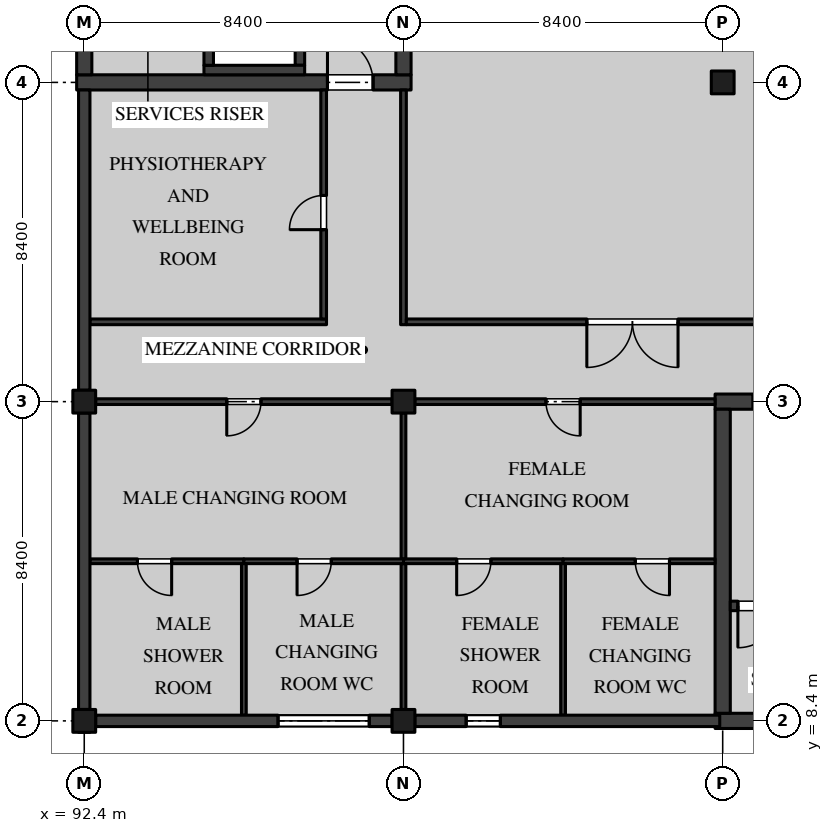
"""IFC4 building model, lengths in metres.
Left out: names, types, materials, properties, quantities, classifications, styles, units other than length and angle.
Written with IfcOpenShell. Run it as: python <this file> out.ifc"""

import sys

from ifc_helpers import new_model, si_unit, direction, frame, frame_2d, origin, origin_2d, place, context, subcontext, project, spatial, polyline, rectangle, outline, extrude, element, fill, save


model = new_model("IFC4")
c1 = context("Model", 3, precision=1e-05, world=origin(), true_north=direction((0.0, 1.0)))
c2 = subcontext(c1, "Body", "Model", "MODEL_VIEW")
j1 = project(units=[si_unit("LENGTHUNIT", "METRE"), si_unit("PLANEANGLEUNIT", "RADIAN")], contexts=[c1])
p1 = place(None, origin())
s1 = spatial("IfcSite", under=j1, at=p1, CompositionType="ELEMENT")
p2 = place(p1, origin())
s2 = spatial("IfcBuilding", under=s1, at=p2, CompositionType="ELEMENT")
p3 = place(p2, frame((0.0, 0.0, 5.4)))
s3 = spatial("IfcBuildingStorey", under=s2, at=p3, CompositionType="ELEMENT", Elevation=5.4)
for number, where, z_axis, x_axis in (
    (1, (92.4, 8.4, 0.0), (0.0, 0.0, 1.0), (1.0, 0.0, 0.0)),
    (2, (92.4, 16.8, 0.0), (0.0, 0.0, 1.0), (1.0, 0.0, 0.0)),
    (3, (100.8, 8.4, 0.0), (0.0, 0.0, 1.0), (1.0, 0.0, 0.0)),
    (4, (100.8, 16.8, 0.0), (0.0, 0.0, 1.0), (1.0, 0.0, 0.0)),
    (5, (109.2, 25.2, 0.0), (0.0, 0.0, 1.0), (1.0, 0.0, 0.0)),
):
    element("IfcColumn", number, at=place(p3, frame(where, z_axis=z_axis, x_axis=x_axis)), inside=s3, PredefinedType="COLUMN", context=c2, shape_type="SweptSolid", body=[
        extrude(rectangle(XDim=0.6, YDim=0.6, at=origin_2d()), origin(), (0.0, 0.0, 1.0), 3.0),
    ])
p4 = place(p3, frame((92.2, 25.2, 0.0), z_axis=(0.0, 0.0, 1.0), x_axis=(1.0, 0.0, 0.0)))
e6 = element("IfcWall", 6, at=p4, inside=s3, PredefinedType="SHEAR", context=c2, shape_type="SweptSolid", body=[
    extrude(rectangle(XDim=8.8, YDim=0.4, at=frame_2d((4.4, 0.0))), origin(), (0.0, 0.0, 1.0), 3.0),
])
p5 = place(p4, frame((6.6, 0.0, 0.0)))
e7 = element("IfcOpeningElement", 7, at=p5, cuts=e6, PredefinedType="OPENING", context=c2, shape_type="SweptSolid", body=[
    extrude(rectangle(XDim=1.2, YDim=2.1, at=frame_2d((0.6, 1.05))), frame((0.0, 0.21, 0.0), z_axis=(0.0, -1.0, 0.0), x_axis=(1.0, 0.0, 0.0)), (0.0, 0.0, 1.0), 0.42),
])
for number, where, z_axis, x_axis in (
    (8, (92.4, 25.4, 0.0), (0.0, 0.0, 1.0), (0.0, 1.0, 0.0)),
    (9, (100.8, 25.4, 0.0), (0.0, 0.0, 1.0), (0.0, 1.0, 0.0)),
):
    element("IfcWall", number, at=place(p3, frame(where, z_axis=z_axis, x_axis=x_axis)), inside=s3, PredefinedType="SHEAR", context=c2, shape_type="SweptSolid", body=[
        extrude(rectangle(XDim=8.0, YDim=0.4, at=frame_2d((4.0, 0.0))), origin(), (0.0, 0.0, 1.0), 3.0),
    ])
p6 = place(p3, frame((109.0, 8.4, 0.0), z_axis=(0.0, 0.0, 1.0), x_axis=(1.0, 0.0, 0.0)))
e10 = element("IfcWall", 10, at=p6, inside=s3, PredefinedType="SHEAR", context=c2, shape_type="SweptSolid", body=[
    extrude(rectangle(XDim=8.8, YDim=0.4, at=frame_2d((4.4, 0.0))), origin(), (0.0, 0.0, 1.0), 3.0),
])
p7 = place(p3, frame((109.0, 16.8, 0.0), z_axis=(0.0, 0.0, 1.0), x_axis=(1.0, 0.0, 0.0)))
e11 = element("IfcWall", 11, at=p7, inside=s3, PredefinedType="SHEAR", context=c2, shape_type="SweptSolid", body=[
    extrude(rectangle(XDim=8.8, YDim=0.4, at=frame_2d((4.4, 0.0))), origin(), (0.0, 0.0, 1.0), 3.0),
])
p8 = place(p7, frame((1.0, 0.0, 0.0)))
e12 = element("IfcOpeningElement", 12, at=p8, cuts=e11, PredefinedType="OPENING", context=c2, shape_type="SweptSolid", body=[
    extrude(rectangle(XDim=1.2, YDim=2.1, at=frame_2d((0.6, 1.05))), frame((0.0, 0.21, 0.0), z_axis=(0.0, -1.0, 0.0), x_axis=(1.0, 0.0, 0.0)), (0.0, 0.0, 1.0), 0.42),
])
p9 = place(p3, frame((109.2, 8.6, 0.0), z_axis=(0.0, 0.0, 1.0), x_axis=(0.0, 1.0, 0.0)))
e13 = element("IfcWall", 13, at=p9, inside=s3, PredefinedType="SHEAR", context=c2, shape_type="SweptSolid", body=[
    extrude(rectangle(XDim=8.0, YDim=0.4, at=frame_2d((4.0, 0.0))), origin(), (0.0, 0.0, 1.0), 3.0),
])
p10 = place(p3, frame((109.4, 11.425, 0.0), z_axis=(0.0, 0.0, 1.0), x_axis=(1.0, 0.0, 0.0)))
e14 = element("IfcWall", 14, at=p10, inside=s3, PredefinedType="SOLIDWALL", context=c2, shape_type="SweptSolid", body=[
    extrude(rectangle(XDim=8.0, YDim=0.25, at=frame_2d((4.0, 0.0))), origin(), (0.0, 0.0, 1.0), 3.0),
])
p11 = place(p10, frame((0.2, 0.0, 0.0)))
e15 = element("IfcOpeningElement", 15, at=p11, cuts=e14, PredefinedType="OPENING", context=c2, shape_type="SweptSolid", body=[
    extrude(rectangle(XDim=1.1, YDim=2.1, at=frame_2d((0.55, 1.05))), frame((0.0, 0.135, 0.0), z_axis=(0.0, -1.0, 0.0), x_axis=(1.0, 0.0, 0.0)), (0.0, 0.0, 1.0), 0.27),
])
p12 = place(p3, frame((98.075, 25.65, 0.0), z_axis=(0.0, 0.0, 1.0), x_axis=(0.0, 1.0, 0.0)))
e16 = element("IfcWall", 16, at=p12, inside=s3, PredefinedType="SOLIDWALL", context=c2, shape_type="SweptSolid", body=[
    extrude(rectangle(XDim=2.3, YDim=0.25, at=frame_2d((1.15, 0.0))), origin(), (0.0, 0.0, 1.0), 3.0),
])
p13 = place(p3, frame((95.55, 25.525, 0.0), z_axis=(0.0, 0.0, 1.0), x_axis=(1.0, 0.0, 0.0)))
e17 = element("IfcWall", 17, at=p13, inside=s3, PredefinedType="SOLIDWALL", context=c2, shape_type="SweptSolid", body=[
    extrude(rectangle(XDim=2.65, YDim=0.25, at=frame_2d((1.325, 0.0))), origin(), (0.0, 0.0, 1.0), 3.0),
])
p14 = place(p3, frame((95.675, 25.65, 0.0), z_axis=(0.0, 0.0, 1.0), x_axis=(0.0, 1.0, 0.0)))
e18 = element("IfcWall", 18, at=p14, inside=s3, PredefinedType="SOLIDWALL", context=c2, shape_type="SweptSolid", body=[
    extrude(rectangle(XDim=2.3, YDim=0.25, at=frame_2d((1.15, 0.0))), origin(), (0.0, 0.0, 1.0), 3.0),
])
p15 = place(p3, frame((100.8, 18.825, 0.0), z_axis=(0.0, 0.0, 1.0), x_axis=(0.0, 1.0, 0.0)))
e19 = element("IfcWall", 19, at=p15, inside=s3, PredefinedType="PARTITIONING", context=c2, shape_type="SweptSolid", body=[
    extrude(rectangle(XDim=6.175, YDim=0.15, at=frame_2d((3.087, 0.0))), origin(), (0.0, 0.0, 1.0), 2.975),
])
p16 = place(p3, frame((100.875, 18.9, 0.0), z_axis=(0.0, 0.0, 1.0), x_axis=(1.0, 0.0, 0.0)))
e20 = element("IfcWall", 20, at=p16, inside=s3, PredefinedType="PARTITIONING", context=c2, shape_type="SweptSolid", body=[
    extrude(rectangle(XDim=12.425, YDim=0.15, at=frame_2d((6.212, 0.0))), origin(), (0.0, 0.0, 1.0), 4.37),
])
p17 = place(p16, frame((4.75, 0.0, 0.0)))
e21 = element("IfcOpeningElement", 21, at=p17, cuts=e20, PredefinedType="OPENING", context=c2, shape_type="SweptSolid", body=[
    extrude(rectangle(XDim=2.4, YDim=2.7, at=frame_2d((1.2, 1.35))), frame((0.0, 0.085, 0.0), z_axis=(0.0, -1.0, 0.0), x_axis=(1.0, 0.0, 0.0)), (0.0, 0.0, 1.0), 0.17),
])
p18 = place(p3, frame((101.1, 16.8, 0.0), z_axis=(0.0, 0.0, 1.0), x_axis=(1.0, 0.0, 0.0)))
e22 = element("IfcWall", 22, at=p18, inside=s3, PredefinedType="PARTITIONING", context=c2, shape_type="SweptSolid", body=[
    extrude(rectangle(XDim=7.9, YDim=0.15, at=frame_2d((3.95, 0.0))), origin(), (0.0, 0.0, 1.0), 4.37),
])
p19 = place(p18, frame((3.45, 0.0, 0.0)))
e23 = element("IfcOpeningElement", 23, at=p19, cuts=e22, PredefinedType="OPENING", context=c2, shape_type="SweptSolid", body=[
    extrude(rectangle(XDim=0.9, YDim=2.1, at=frame_2d((0.45, 1.05))), frame((0.0, 0.085, 0.0), z_axis=(0.0, -1.0, 0.0), x_axis=(1.0, 0.0, 0.0)), (0.0, 0.0, 1.0), 0.17),
])
p20 = place(p3, frame((92.7, 16.8, 0.0), z_axis=(0.0, 0.0, 1.0), x_axis=(1.0, 0.0, 0.0)))
e24 = element("IfcWall", 24, at=p20, inside=s3, PredefinedType="PARTITIONING", context=c2, shape_type="SweptSolid", body=[
    extrude(rectangle(XDim=7.8, YDim=0.15, at=frame_2d((3.9, 0.0))), origin(), (0.0, 0.0, 1.0), 4.37),
])
p21 = place(p20, frame((3.45, 0.0, 0.0)))
e25 = element("IfcOpeningElement", 25, at=p21, cuts=e24, PredefinedType="OPENING", context=c2, shape_type="SweptSolid", body=[
    extrude(rectangle(XDim=0.9, YDim=2.1, at=frame_2d((0.45, 1.05))), frame((0.0, 0.085, 0.0), z_axis=(0.0, -1.0, 0.0), x_axis=(1.0, 0.0, 0.0)), (0.0, 0.0, 1.0), 0.17),
])
p22 = place(p3, frame((92.55, 18.9, 0.0), z_axis=(0.0, 0.0, 1.0), x_axis=(1.0, 0.0, 0.0)))
e26 = element("IfcWall", 26, at=p22, inside=s3, PredefinedType="PARTITIONING", context=c2, shape_type="SweptSolid", body=[
    extrude(rectangle(XDim=6.225, YDim=0.15, at=frame_2d((3.112, 0.0))), origin(), (0.0, 0.0, 1.0), 4.37),
])
p23 = place(p3, frame((98.7, 18.975, 0.0), z_axis=(0.0, 0.0, 1.0), x_axis=(0.0, 1.0, 0.0)))
e27 = element("IfcWall", 27, at=p23, inside=s3, PredefinedType="PARTITIONING", context=c2, shape_type="SweptSolid", body=[
    extrude(rectangle(XDim=6.025, YDim=0.15, at=frame_2d((3.012, 0.0))), origin(), (0.0, 0.0, 1.0), 4.37),
])
p24 = place(p23, frame((2.35, 0.0, 0.0)))
e28 = element("IfcOpeningElement", 28, at=p24, cuts=e27, PredefinedType="OPENING", context=c2, shape_type="SweptSolid", body=[
    extrude(rectangle(XDim=0.9, YDim=2.1, at=frame_2d((0.45, 1.05))), frame((0.0, 0.085, 0.0), z_axis=(0.0, -1.0, 0.0), x_axis=(1.0, 0.0, 0.0)), (0.0, 0.0, 1.0), 0.17),
])
p25 = place(p3, frame((100.8, 12.6, 0.0), z_axis=(0.0, 0.0, 1.0), x_axis=(1.0, 0.0, 0.0)))
e29 = element("IfcWall", 29, at=p25, inside=s3, PredefinedType="PARTITIONING", context=c2, shape_type="SweptSolid", body=[
    extrude(rectangle(XDim=4.2, YDim=0.125, at=frame_2d((2.1, 0.0))), origin(), (0.0, 0.0, 1.0), 4.37),
])
p26 = place(p25, frame((1.4, 0.0, 0.0)))
e30 = element("IfcOpeningElement", 30, at=p26, cuts=e29, PredefinedType="OPENING", context=c2, shape_type="SweptSolid", body=[
    extrude(rectangle(XDim=0.9, YDim=2.1, at=frame_2d((0.45, 1.05))), frame((0.0, 0.073, 0.0), z_axis=(0.0, -1.0, 0.0), x_axis=(1.0, 0.0, 0.0)), (0.0, 0.0, 1.0), 0.145),
])
p27 = place(p3, frame((105.0, 12.6, 0.0), z_axis=(0.0, 0.0, 1.0), x_axis=(1.0, 0.0, 0.0)))
e31 = element("IfcWall", 31, at=p27, inside=s3, PredefinedType="PARTITIONING", context=c2, shape_type="SweptSolid", body=[
    extrude(rectangle(XDim=4.0, YDim=0.125, at=frame_2d((2.0, 0.0))), origin(), (0.0, 0.0, 1.0), 4.37),
])
p28 = place(p27, frame((1.9, 0.0, 0.0)))
e32 = element("IfcOpeningElement", 32, at=p28, cuts=e31, PredefinedType="OPENING", context=c2, shape_type="SweptSolid", body=[
    extrude(rectangle(XDim=0.9, YDim=2.1, at=frame_2d((0.45, 1.05))), frame((0.0, 0.073, 0.0), z_axis=(0.0, -1.0, 0.0), x_axis=(1.0, 0.0, 0.0)), (0.0, 0.0, 1.0), 0.145),
])
p29 = place(p3, frame((100.8, 12.662, 0.0), z_axis=(0.0, 0.0, 1.0), x_axis=(0.0, 1.0, 0.0)))
e33 = element("IfcWall", 33, at=p29, inside=s3, PredefinedType="PARTITIONING", context=c2, shape_type="SweptSolid", body=[
    extrude(rectangle(XDim=3.838, YDim=0.125, at=frame_2d((1.919, 0.0))), origin(), (0.0, 0.0, 1.0), 2.975),
])
p30 = place(p3, frame((105.0, 8.55, 0.0), z_axis=(0.0, 0.0, 1.0), x_axis=(0.0, 1.0, 0.0)))
e34 = element("IfcWall", 34, at=p30, inside=s3, PredefinedType="PARTITIONING", context=c2, shape_type="SweptSolid", body=[
    extrude(rectangle(XDim=3.987, YDim=0.125, at=frame_2d((1.994, 0.0))), origin(), (0.0, 0.0, 1.0), 4.37),
])
p31 = place(p3, frame((100.8, 8.7, 0.0), z_axis=(0.0, 0.0, 1.0), x_axis=(0.0, 1.0, 0.0)))
e35 = element("IfcWall", 35, at=p31, inside=s3, PredefinedType="PARTITIONING", context=c2, shape_type="SweptSolid", body=[
    extrude(rectangle(XDim=3.837, YDim=0.125, at=frame_2d((1.918, 0.0))), origin(), (0.0, 0.0, 1.0), 2.975),
])
p32 = place(p3, frame((92.55, 12.6, 0.0), z_axis=(0.0, 0.0, 1.0), x_axis=(1.0, 0.0, 0.0)))
e36 = element("IfcWall", 36, at=p32, inside=s3, PredefinedType="PARTITIONING", context=c2, shape_type="SweptSolid", body=[
    extrude(rectangle(XDim=4.05, YDim=0.125, at=frame_2d((2.025, 0.0))), origin(), (0.0, 0.0, 1.0), 4.37),
])
p33 = place(p32, frame((1.25, 0.0, 0.0)))
e37 = element("IfcOpeningElement", 37, at=p33, cuts=e36, PredefinedType="OPENING", context=c2, shape_type="SweptSolid", body=[
    extrude(rectangle(XDim=0.9, YDim=2.1, at=frame_2d((0.45, 1.05))), frame((0.0, 0.073, 0.0), z_axis=(0.0, -1.0, 0.0), x_axis=(1.0, 0.0, 0.0)), (0.0, 0.0, 1.0), 0.145),
])
p34 = place(p3, frame((96.6, 12.6, 0.0), z_axis=(0.0, 0.0, 1.0), x_axis=(1.0, 0.0, 0.0)))
e38 = element("IfcWall", 38, at=p34, inside=s3, PredefinedType="PARTITIONING", context=c2, shape_type="SweptSolid", body=[
    extrude(rectangle(XDim=4.2, YDim=0.125, at=frame_2d((2.1, 0.0))), origin(), (0.0, 0.0, 1.0), 4.37),
])
p35 = place(p34, frame((1.4, 0.0, 0.0)))
e39 = element("IfcOpeningElement", 39, at=p35, cuts=e38, PredefinedType="OPENING", context=c2, shape_type="SweptSolid", body=[
    extrude(rectangle(XDim=0.9, YDim=2.1, at=frame_2d((0.45, 1.05))), frame((0.0, 0.073, 0.0), z_axis=(0.0, -1.0, 0.0), x_axis=(1.0, 0.0, 0.0)), (0.0, 0.0, 1.0), 0.145),
])
p36 = place(p3, frame((96.6, 8.55, 0.0), z_axis=(0.0, 0.0, 1.0), x_axis=(0.0, 1.0, 0.0)))
e40 = element("IfcWall", 40, at=p36, inside=s3, PredefinedType="PARTITIONING", context=c2, shape_type="SweptSolid", body=[
    extrude(rectangle(XDim=3.987, YDim=0.125, at=frame_2d((1.994, 0.0))), origin(), (0.0, 0.0, 1.0), 4.37),
])
p37 = place(p3, frame((92.4, 17.1, 3.0), z_axis=(0.0, 0.0, 1.0), x_axis=(0.0, -1.0, 0.0)))
e41 = element("IfcWall", 41, at=p37, inside=s3, PredefinedType="SOLIDWALL", context=c2, shape_type="SweptSolid", body=[
    extrude(rectangle(XDim=0.6, YDim=0.3, at=frame_2d((0.3, 0.0))), origin(), (0.0, 0.0, 1.0), 1.5),
])
p38 = place(p3, frame((92.4, 25.0, 0.0), z_axis=(0.0, 0.0, 1.0), x_axis=(0.0, -1.0, 0.0)))
e42 = element("IfcWall", 42, at=p38, inside=s3, PredefinedType="SOLIDWALL", context=c2, shape_type="SweptSolid", body=[
    extrude(rectangle(XDim=7.9, YDim=0.3, at=frame_2d((3.95, 0.0))), origin(), (0.0, 0.0, 1.0), 2.975),
])
p39 = place(p3, frame((92.4, 8.7, 3.0), z_axis=(0.0, 0.0, 1.0), x_axis=(0.0, -1.0, 0.0)))
e43 = element("IfcWall", 43, at=p39, inside=s3, PredefinedType="SOLIDWALL", context=c2, shape_type="SweptSolid", body=[
    extrude(rectangle(XDim=0.6, YDim=0.3, at=frame_2d((0.3, 0.0))), origin(), (0.0, 0.0, 1.0), 1.5),
])
p40 = place(p3, frame((92.4, 16.5, 0.0), z_axis=(0.0, 0.0, 1.0), x_axis=(0.0, -1.0, 0.0)))
e44 = element("IfcWall", 44, at=p40, inside=s3, PredefinedType="SOLIDWALL", context=c2, shape_type="SweptSolid", body=[
    extrude(rectangle(XDim=7.8, YDim=0.3, at=frame_2d((3.9, 0.0))), origin(), (0.0, 0.0, 1.0), 2.975),
])
p41 = place(p3, frame((100.5, 8.4, 3.0), z_axis=(0.0, 0.0, 1.0), x_axis=(1.0, 0.0, 0.0)))
e45 = element("IfcWall", 45, at=p41, inside=s3, PredefinedType="SOLIDWALL", context=c2, shape_type="SweptSolid", body=[
    extrude(outline(polyline([(0.0, 0.0), (0.6, 0.0), (0.6, 1.0), (0.0, 1.0), (0.0, 0.0)])), frame((0.0, 0.15, 0.0), z_axis=(0.0, -1.0, 0.0), x_axis=(1.0, 0.0, 0.0)), (0.0, 0.0, 1.0), 0.3),
])
p42 = place(p3, frame((92.7, 8.4, 0.0), z_axis=(0.0, 0.0, 1.0), x_axis=(1.0, 0.0, 0.0)))
e46 = element("IfcWall", 46, at=p42, inside=s3, PredefinedType="SOLIDWALL", context=c2, shape_type="SweptSolid", body=[
    extrude(outline(polyline([(0.0, 0.0), (7.8, 0.0), (7.8, 4.0), (0.0, 4.0), (0.0, 0.0)])), frame((0.0, 0.15, 0.0), z_axis=(0.0, -1.0, 0.0), x_axis=(1.0, 0.0, 0.0)), (0.0, 0.0, 1.0), 0.3),
])
p43 = place(p42, frame((4.8, 0.0, 0.6)))
e47 = element("IfcOpeningElement", 47, at=p43, cuts=e46, PredefinedType="OPENING", context=c2, shape_type="SweptSolid", body=[
    extrude(rectangle(XDim=2.4, YDim=2.1, at=frame_2d((1.2, 1.05))), frame((0.0, 0.16, 0.0), z_axis=(0.0, -1.0, 0.0), x_axis=(1.0, 0.0, 0.0)), (0.0, 0.0, 1.0), 0.32),
])
p44 = place(p3, frame((101.1, 8.4, 0.0), z_axis=(0.0, 0.0, 1.0), x_axis=(1.0, 0.0, 0.0)))
e48 = element("IfcWall", 48, at=p44, inside=s3, PredefinedType="SOLIDWALL", context=c2, shape_type="SweptSolid", body=[
    extrude(outline(polyline([(0.0, 0.0), (8.022, 0.0), (8.022, 4.0), (7.9, 4.0), (0.0, 4.0), (0.0, 0.0)])), frame((0.0, 0.15, 0.0), z_axis=(0.0, -1.0, 0.0), x_axis=(1.0, 0.0, 0.0)), (0.0, 0.0, 1.0), 0.3),
])
p45 = place(p44, frame((1.35, 0.0, 1.5)))
e49 = element("IfcOpeningElement", 49, at=p45, cuts=e48, PredefinedType="OPENING", context=c2, shape_type="SweptSolid", body=[
    extrude(rectangle(XDim=0.9, YDim=1.2, at=frame_2d((0.45, 0.6))), frame((0.0, 0.16, 0.0), z_axis=(0.0, -1.0, 0.0), x_axis=(1.0, 0.0, 0.0)), (0.0, 0.0, 1.0), 0.32),
])
p46 = place(p5, origin())
e50 = element("IfcDoor", 50, at=p46, inside=s3, OperationType="SINGLE_SWING_RIGHT", PredefinedType="DOOR", context=c2, shape_type="SweptSolid", body=[
    extrude(rectangle(XDim=1.2, YDim=2.1, at=frame_2d((0.6, 1.05))), frame((0.0, 0.035, 0.0), z_axis=(0.0, -1.0, 0.0), x_axis=(1.0, 0.0, 0.0)), (0.0, 0.0, 1.0), 0.07),
])
fill(e7, e50)
p47 = place(p11, frame((1.1, 0.0, 0.0), z_axis=(0.0, 0.0, 1.0), x_axis=(-1.0, 0.0, 0.0)))
e51 = element("IfcDoor", 51, at=p47, inside=s3, OperationType="SINGLE_SWING_LEFT", PredefinedType="DOOR", context=c2, shape_type="SweptSolid", body=[
    extrude(rectangle(XDim=1.1, YDim=2.1, at=frame_2d((0.55, 1.05))), frame((0.0, 0.035, 0.0), z_axis=(0.0, -1.0, 0.0), x_axis=(1.0, 0.0, 0.0)), (0.0, 0.0, 1.0), 0.07),
])
fill(e15, e51)
p48 = place(p17, frame((2.4, 0.0, 0.0), z_axis=(0.0, 0.0, 1.0), x_axis=(-1.0, 0.0, 0.0)))
e52 = element("IfcDoor", 52, at=p48, inside=s3, OperationType="DOUBLE_DOOR_SINGLE_SWING", PredefinedType="DOOR", context=c2, shape_type="SweptSolid", body=[
    extrude(rectangle(XDim=2.4, YDim=2.7, at=frame_2d((1.2, 1.35))), frame((0.0, 0.025, 0.0), z_axis=(0.0, -1.0, 0.0), x_axis=(1.0, 0.0, 0.0)), (0.0, 0.0, 1.0), 0.05),
])
fill(e21, e52)
p49 = place(p19, frame((0.9, 0.0, 0.0), z_axis=(0.0, 0.0, 1.0), x_axis=(-1.0, 0.0, 0.0)))
e53 = element("IfcDoor", 53, at=p49, inside=s3, OperationType="SINGLE_SWING_RIGHT", PredefinedType="DOOR", context=c2, shape_type="SweptSolid", body=[
    extrude(rectangle(XDim=0.9, YDim=2.1, at=frame_2d((0.45, 1.05))), frame((0.0, 0.025, 0.0), z_axis=(0.0, -1.0, 0.0), x_axis=(1.0, 0.0, 0.0)), (0.0, 0.0, 1.0), 0.05),
])
fill(e23, e53)
p50 = place(p26, frame((0.9, 0.0, 0.0), z_axis=(0.0, 0.0, 1.0), x_axis=(-1.0, 0.0, 0.0)))
e54 = element("IfcDoor", 54, at=p50, inside=s3, OperationType="SINGLE_SWING_LEFT", PredefinedType="DOOR", context=c2, shape_type="SweptSolid", body=[
    extrude(rectangle(XDim=0.9, YDim=2.1, at=frame_2d((0.45, 1.05))), frame((0.0, 0.02, 0.0), z_axis=(0.0, -1.0, 0.0), x_axis=(1.0, 0.0, 0.0)), (0.0, 0.0, 1.0), 0.04),
])
fill(e30, e54)
p51 = place(p28, frame((0.9, 0.0, 0.0), z_axis=(0.0, 0.0, 1.0), x_axis=(-1.0, 0.0, 0.0)))
e55 = element("IfcDoor", 55, at=p51, inside=s3, OperationType="SINGLE_SWING_RIGHT", PredefinedType="DOOR", context=c2, shape_type="SweptSolid", body=[
    extrude(rectangle(XDim=0.9, YDim=2.1, at=frame_2d((0.45, 1.05))), frame((0.0, 0.02, 0.0), z_axis=(0.0, -1.0, 0.0), x_axis=(1.0, 0.0, 0.0)), (0.0, 0.0, 1.0), 0.04),
])
fill(e32, e55)
p52 = place(p21, frame((0.9, 0.0, 0.0), z_axis=(0.0, 0.0, 1.0), x_axis=(-1.0, 0.0, 0.0)))
e56 = element("IfcDoor", 56, at=p52, inside=s3, OperationType="SINGLE_SWING_LEFT", PredefinedType="DOOR", context=c2, shape_type="SweptSolid", body=[
    extrude(rectangle(XDim=0.9, YDim=2.1, at=frame_2d((0.45, 1.05))), frame((0.0, 0.025, 0.0), z_axis=(0.0, -1.0, 0.0), x_axis=(1.0, 0.0, 0.0)), (0.0, 0.0, 1.0), 0.05),
])
fill(e25, e56)
p53 = place(p33, frame((0.9, 0.0, 0.0), z_axis=(0.0, 0.0, 1.0), x_axis=(-1.0, 0.0, 0.0)))
e57 = element("IfcDoor", 57, at=p53, inside=s3, OperationType="SINGLE_SWING_RIGHT", PredefinedType="DOOR", context=c2, shape_type="SweptSolid", body=[
    extrude(rectangle(XDim=0.9, YDim=2.1, at=frame_2d((0.45, 1.05))), frame((0.0, 0.02, 0.0), z_axis=(0.0, -1.0, 0.0), x_axis=(1.0, 0.0, 0.0)), (0.0, 0.0, 1.0), 0.04),
])
fill(e37, e57)
p54 = place(p35, frame((0.9, 0.0, 0.0), z_axis=(0.0, 0.0, 1.0), x_axis=(-1.0, 0.0, 0.0)))
e58 = element("IfcDoor", 58, at=p54, inside=s3, OperationType="SINGLE_SWING_LEFT", PredefinedType="DOOR", context=c2, shape_type="SweptSolid", body=[
    extrude(rectangle(XDim=0.9, YDim=2.1, at=frame_2d((0.45, 1.05))), frame((0.0, 0.02, 0.0), z_axis=(0.0, -1.0, 0.0), x_axis=(1.0, 0.0, 0.0)), (0.0, 0.0, 1.0), 0.04),
])
fill(e39, e58)
p55 = place(p24, origin())
e59 = element("IfcDoor", 59, at=p55, inside=s3, OperationType="SINGLE_SWING_RIGHT", PredefinedType="DOOR", context=c2, shape_type="SweptSolid", body=[
    extrude(rectangle(XDim=0.9, YDim=2.1, at=frame_2d((0.45, 1.05))), frame((0.0, 0.025, 0.0), z_axis=(0.0, -1.0, 0.0), x_axis=(1.0, 0.0, 0.0)), (0.0, 0.0, 1.0), 0.05),
])
fill(e28, e59)
p56 = place(p43, origin())
e60 = element("IfcWindow", 60, at=p56, inside=s3, PartitioningType="SINGLE_PANEL", PredefinedType="WINDOW", context=c2, shape_type="SweptSolid", body=[
    extrude(rectangle(XDim=2.4, YDim=2.1, at=frame_2d((1.2, 1.05))), frame((0.0, 0.06, 0.0), z_axis=(0.0, -1.0, 0.0), x_axis=(1.0, 0.0, 0.0)), (0.0, 0.0, 1.0), 0.12),
])
fill(e47, e60)
p57 = place(p45, origin())
e61 = element("IfcWindow", 61, at=p57, inside=s3, PartitioningType="SINGLE_PANEL", PredefinedType="WINDOW", context=c2, shape_type="SweptSolid", body=[
    extrude(rectangle(XDim=0.9, YDim=1.2, at=frame_2d((0.45, 0.6))), frame((0.0, 0.04, 0.0), z_axis=(0.0, -1.0, 0.0), x_axis=(1.0, 0.0, 0.0)), (0.0, 0.0, 1.0), 0.08),
])
fill(e49, e61)
save(model, sys.argv[1])
